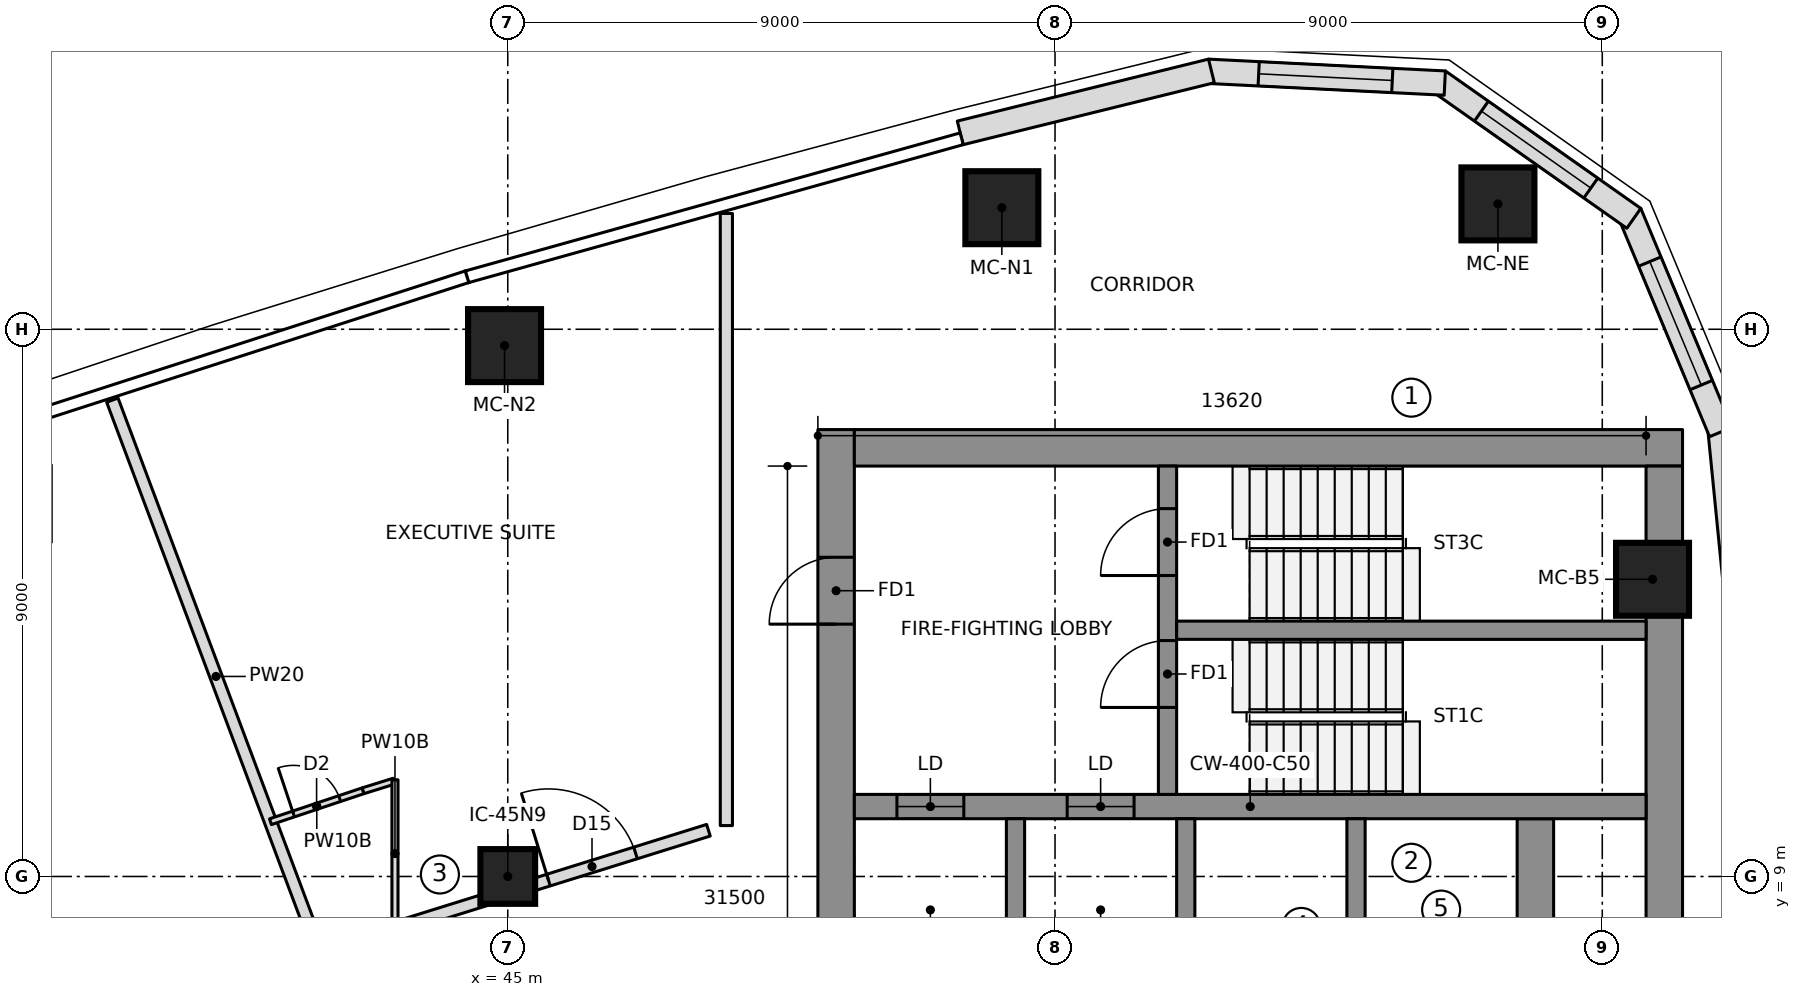
"""IFC4 building model, lengths in metres.
Left out: names, types, materials, properties, quantities, classifications, styles, units other than length and angle.
Written with IfcOpenShell. Run it as: python <this file> out.ifc"""

import sys

from ifc_helpers import new_model, si_unit, direction, frame, frame_2d, origin, origin_2d, place, context, subcontext, project, spatial, polyline, rectangle, outline, extrude, element, fill, save


model = new_model("IFC4")
c1 = context("Model", 3, precision=1e-05, world=origin(), true_north=direction((0.0, 1.0)))
c2 = subcontext(c1, "Body", "Model", "MODEL_VIEW")
j1 = project(units=[si_unit("LENGTHUNIT", "METRE"), si_unit("PLANEANGLEUNIT", "RADIAN")], contexts=[c1])
p1 = place(None, origin())
s1 = spatial("IfcSite", under=j1, at=p1, CompositionType="ELEMENT")
p2 = place(p1, origin())
s2 = spatial("IfcBuilding", under=s1, at=p2, CompositionType="ELEMENT")
p3 = place(p2, frame((0.0, 0.0, 227.9)))
s3 = spatial("IfcBuildingStorey", under=s2, at=p3, CompositionType="ELEMENT", Elevation=227.9)
p4 = place(p3, frame((50.4, 6.65, 0.0), z_axis=(0.0, 0.0, 1.0), x_axis=(0.0, 1.0, 0.0)))
e1 = element("IfcWall", 1, at=p4, inside=s3, PredefinedType="SHEAR", context=c2, shape_type="SweptSolid", body=[
    extrude(rectangle(XDim=9.7, YDim=0.6, at=frame_2d((4.85, 0.0))), origin(), (0.0, 0.0, 1.0), 3.55),
])
p5 = place(p4, frame((6.5, 0.0, 0.0)))
e2 = element("IfcOpeningElement", 2, at=p5, cuts=e1, PredefinedType="OPENING", context=c2, shape_type="SweptSolid", body=[
    extrude(rectangle(XDim=1.1, YDim=2.1, at=frame_2d((0.55, 1.05))), frame((0.0, 0.31, 0.0), z_axis=(0.0, -1.0, 0.0), x_axis=(1.0, 0.0, 0.0)), (0.0, 0.0, 1.0), 0.62),
])
p6 = place(p3, frame((50.7, 16.05, 0.0), z_axis=(0.0, 0.0, 1.0), x_axis=(1.0, 0.0, 0.0)))
e3 = element("IfcWall", 3, at=p6, inside=s3, PredefinedType="SHEAR", context=c2, shape_type="SweptSolid", body=[
    extrude(rectangle(XDim=13.62, YDim=0.6, at=frame_2d((6.81, 0.0))), origin(), (0.0, 0.0, 1.0), 3.55),
])
p7 = place(p3, frame((64.02, 7.502, 0.0), z_axis=(0.0, 0.0, 1.0), x_axis=(0.0, 1.0, 0.0)))
e4 = element("IfcWall", 4, at=p7, inside=s3, PredefinedType="SHEAR", context=c2, shape_type="SweptSolid", body=[
    extrude(rectangle(XDim=8.248, YDim=0.6, at=frame_2d((4.124, 0.0))), origin(), (0.0, 0.0, 1.0), 3.55),
])
p8 = place(p3, frame((61.9, -9.95, 0.0), z_axis=(0.0, 0.0, 1.0), x_axis=(0.0, 1.0, 0.0)))
e5 = element("IfcWall", 5, at=p8, inside=s3, PredefinedType="SHEAR", context=c2, shape_type="SweptSolid", body=[
    extrude(rectangle(XDim=19.9, YDim=0.6, at=frame_2d((9.95, 0.0))), origin(), (0.0, 0.0, 1.0), 3.55),
])
p9 = place(p3, frame((50.7, 10.15, 0.0), z_axis=(0.0, 0.0, 1.0), x_axis=(1.0, 0.0, 0.0)))
e6 = element("IfcWall", 6, at=p9, inside=s3, PredefinedType="SHEAR", context=c2, shape_type="SweptSolid", body=[
    extrude(rectangle(XDim=13.02, YDim=0.4, at=frame_2d((6.51, 0.0))), origin(), (0.0, 0.0, 1.0), 3.55),
])
p10 = place(p9, frame((0.7, 0.0, 0.0)))
e7 = element("IfcOpeningElement", 7, at=p10, cuts=e6, PredefinedType="OPENING", context=c2, shape_type="SweptSolid", body=[
    extrude(rectangle(XDim=1.1, YDim=2.1, at=frame_2d((0.55, 1.05))), frame((0.0, 0.21, 0.0), z_axis=(0.0, -1.0, 0.0), x_axis=(1.0, 0.0, 0.0)), (0.0, 0.0, 1.0), 0.42),
])
p11 = place(p9, frame((3.5, 0.0, 0.0)))
e8 = element("IfcOpeningElement", 8, at=p11, cuts=e6, PredefinedType="OPENING", context=c2, shape_type="SweptSolid", body=[
    extrude(rectangle(XDim=1.1, YDim=2.1, at=frame_2d((0.55, 1.05))), frame((0.0, 0.21, 0.0), z_axis=(0.0, -1.0, 0.0), x_axis=(1.0, 0.0, 0.0)), (0.0, 0.0, 1.0), 0.42),
])
for number, where, z_axis, x_axis in (
    (9, (53.35, 6.95, 0.0), (0.0, 0.0, 1.0), (0.0, 1.0, 0.0)),
    (10, (56.15, 6.95, 0.0), (0.0, 0.0, 1.0), (0.0, 1.0, 0.0)),
    (11, (58.95, 6.95, 0.0), (0.0, 0.0, 1.0), (0.0, 1.0, 0.0)),
):
    element("IfcWall", number, at=place(p3, frame(where, z_axis=z_axis, x_axis=x_axis)), inside=s3, PredefinedType="SHEAR", context=c2, shape_type="SweptSolid", body=[
        extrude(rectangle(XDim=3.0, YDim=0.3, at=frame_2d((1.5, 0.0))), origin(), (0.0, 0.0, 1.0), 3.55),
    ])
p12 = place(p3, frame((55.85, 10.35, 0.0), z_axis=(0.0, 0.0, 1.0), x_axis=(0.0, 1.0, 0.0)))
e12 = element("IfcWall", 12, at=p12, inside=s3, PredefinedType="SHEAR", context=c2, shape_type="SweptSolid", body=[
    extrude(rectangle(XDim=5.4, YDim=0.3, at=frame_2d((2.7, 0.0))), origin(), (0.0, 0.0, 1.0), 3.55),
])
p13 = place(p12, frame((1.43, 0.0, 0.0)))
e13 = element("IfcOpeningElement", 13, at=p13, cuts=e12, PredefinedType="OPENING", context=c2, shape_type="SweptSolid", body=[
    extrude(rectangle(XDim=1.1, YDim=2.1, at=frame_2d((0.55, 1.05))), frame((0.0, 0.16, 0.0), z_axis=(0.0, -1.0, 0.0), x_axis=(1.0, 0.0, 0.0)), (0.0, 0.0, 1.0), 0.32),
])
p14 = place(p12, frame((3.6, 0.0, 0.0)))
e14 = element("IfcOpeningElement", 14, at=p14, cuts=e12, PredefinedType="OPENING", context=c2, shape_type="SweptSolid", body=[
    extrude(rectangle(XDim=1.1, YDim=2.1, at=frame_2d((0.55, 1.05))), frame((0.0, 0.16, 0.0), z_axis=(0.0, -1.0, 0.0), x_axis=(1.0, 0.0, 0.0)), (0.0, 0.0, 1.0), 0.32),
])
p15 = place(p3, frame((56.0, 13.05, 0.0), z_axis=(0.0, 0.0, 1.0), x_axis=(1.0, 0.0, 0.0)))
e15 = element("IfcWall", 15, at=p15, inside=s3, PredefinedType="SHEAR", context=c2, shape_type="SweptSolid", body=[
    extrude(rectangle(XDim=7.72, YDim=0.3, at=frame_2d((3.86, 0.0))), origin(), (0.0, 0.0, 1.0), 3.55),
])
for number, where, z_axis, x_axis in (
    (16, (63.826, 13.888, 0.0), (0.0, 0.0, 1.0), (1.0, 0.0, 0.0)),
    (17, (61.284, 20.062, 0.0), (0.0, 0.0, 1.0), (1.0, 0.0, 0.0)),
    (18, (53.125, 20.0, 0.0), (0.0, 0.0, 1.0), (1.0, 0.0, 0.0)),
    (19, (44.947, 17.731, 0.0), (0.0, 0.0, 1.0), (1.0, 0.0, 0.0)),
):
    element("IfcColumn", number, at=place(p3, frame(where, z_axis=z_axis, x_axis=x_axis)), inside=s3, PredefinedType="COLUMN", context=c2, shape_type="SweptSolid", body=[
        extrude(rectangle(XDim=1.2, YDim=1.2, at=origin_2d()), origin(), (0.0, 0.0, 1.0), 3.55),
    ])
p16 = place(p3, frame((45.0, 9.0, 0.0), z_axis=(0.0, 0.0, 1.0), x_axis=(1.0, 0.0, 0.0)))
e20 = element("IfcColumn", 20, at=p16, inside=s3, PredefinedType="COLUMN", context=c2, shape_type="SweptSolid", body=[
    extrude(rectangle(XDim=0.9, YDim=0.9, at=origin_2d()), origin(), (0.0, 0.0, 1.0), 3.55),
])
p17 = place(p3, frame((65.342, 12.264, 0.0), z_axis=(0.0, 0.0, 1.0), x_axis=(-0.098718218066, 0.995115427185, 0.0)))
e21 = element("IfcWall", 21, at=p17, inside=s3, PredefinedType="NOTDEFINED", context=c2, shape_type="SweptSolid", body=[
    extrude(outline(polyline([(-0.003, -0.2), (4.123, -0.2), (4.063, 0.2), (0.003, 0.2), (-0.003, -0.2)])), origin(), (0.0, 0.0, 1.0), 3.25),
])
p18 = place(p3, frame((64.938, 16.337, 0.0), z_axis=(0.0, 0.0, 1.0), x_axis=(-0.3844335483, 0.923152667191, 0.0)))
e22 = element("IfcWall", 22, at=p18, inside=s3, PredefinedType="NOTDEFINED", context=c2, shape_type="SweptSolid", body=[
    extrude(outline(polyline([(-0.03, -0.2), (3.871, -0.2), (3.756, 0.2), (0.03, 0.2), (-0.03, -0.2)])), origin(), (0.0, 0.0, 1.0), 3.25),
])
p19 = place(p18, frame((0.807, 0.0, 0.6)))
e23 = element("IfcOpeningElement", 23, at=p19, cuts=e22, PredefinedType="OPENING", context=c2, shape_type="SweptSolid", body=[
    extrude(outline(polyline([(0.0, 1.35), (0.084, 1.771), (0.322, 2.128), (0.679, 2.366), (1.1, 2.45), (1.521, 2.366), (1.878, 2.128), (2.116, 1.771), (2.2, 1.35), (2.2, 1.1), (2.116, 0.679), (1.878, 0.322), (1.521, 0.084), (1.1, 0.0), (0.679, 0.084), (0.322, 0.322), (0.084, 0.679), (0.0, 1.1), (0.0, 1.35)])), frame((0.0, 0.21, 0.0), z_axis=(0.0, -1.0, 0.0), x_axis=(1.0, 0.0, 0.0)), (0.0, 0.0, 1.0), 0.42),
])
p20 = place(p3, frame((63.471, 19.858, 0.0), z_axis=(0.0, 0.0, 1.0), x_axis=(-0.817942545532, 0.575299915009, 0.0)))
e24 = element("IfcWall", 24, at=p20, inside=s3, PredefinedType="NOTDEFINED", context=c2, shape_type="SweptSolid", body=[
    extrude(outline(polyline([(-0.058, -0.2), (3.871, -0.2), (3.756, 0.2), (0.058, 0.2), (-0.058, -0.2)])), origin(), (0.0, 0.0, 1.0), 3.25),
])
p21 = place(p20, frame((0.807, 0.0, 0.6)))
e25 = element("IfcOpeningElement", 25, at=p21, cuts=e24, PredefinedType="OPENING", context=c2, shape_type="SweptSolid", body=[
    extrude(outline(polyline([(0.0, 1.35), (0.084, 1.771), (0.322, 2.128), (0.679, 2.366), (1.1, 2.45), (1.521, 2.366), (1.878, 2.128), (2.116, 1.771), (2.2, 1.35), (2.2, 1.1), (2.116, 0.679), (1.878, 0.322), (1.521, 0.084), (1.1, 0.0), (0.679, 0.084), (0.322, 0.322), (0.084, 0.679), (0.0, 1.1), (0.0, 1.35)])), frame((0.0, 0.21, 0.0), z_axis=(0.0, -1.0, 0.0), x_axis=(1.0, 0.0, 0.0)), (0.0, 0.0, 1.0), 0.42),
])
p22 = place(p3, frame((60.352, 22.052, 0.0), z_axis=(0.0, 0.0, 1.0), x_axis=(-0.998758875872, 0.049806705046, 0.0)))
e26 = element("IfcWall", 26, at=p22, inside=s3, PredefinedType="NOTDEFINED", context=c2, shape_type="SweptSolid", body=[
    extrude(outline(polyline([(-0.058, -0.2), (3.843, -0.2), (3.784, 0.2), (0.058, 0.2), (-0.058, -0.2)])), origin(), (0.0, 0.0, 1.0), 3.25),
])
p23 = place(p22, frame((0.807, 0.0, 0.6)))
e27 = element("IfcOpeningElement", 27, at=p23, cuts=e26, PredefinedType="OPENING", context=c2, shape_type="SweptSolid", body=[
    extrude(outline(polyline([(0.0, 1.35), (0.084, 1.771), (0.322, 2.128), (0.679, 2.366), (1.1, 2.45), (1.521, 2.366), (1.878, 2.128), (2.116, 1.771), (2.2, 1.35), (2.2, 1.1), (2.116, 0.679), (1.878, 0.322), (1.521, 0.084), (1.1, 0.0), (0.679, 0.084), (0.322, 0.322), (0.084, 0.679), (0.0, 1.1), (0.0, 1.35)])), frame((0.0, 0.21, 0.0), z_axis=(0.0, -1.0, 0.0), x_axis=(1.0, 0.0, 0.0)), (0.0, 0.0, 1.0), 0.42),
])
p24 = place(p3, frame((56.543, 22.242, 0.0), z_axis=(0.0, 0.0, 1.0), x_axis=(-0.970902342456, -0.23947576373, 0.0)))
e28 = element("IfcWall", 28, at=p24, inside=s3, PredefinedType="NOTDEFINED", context=c2, shape_type="SweptSolid", body=[
    extrude(outline(polyline([(-0.029, -0.2), (4.226, -0.2), (4.226, 0.2), (0.029, 0.2), (-0.029, -0.2)])), origin(), (0.0, 0.0, 1.0), 3.25),
])
p25 = place(p3, frame((41.906, 7.746, 0.0), z_axis=(0.0, 0.0, 1.0), x_axis=(-0.35112895446, 0.936327110224, 0.0)))
e29 = element("IfcWall", 29, at=p25, inside=s3, PredefinedType="PARTITIONING", context=c2, shape_type="SweptSolid", body=[
    extrude(rectangle(XDim=9.706, YDim=0.2, at=frame_2d((4.853, 0.0))), origin(), (0.0, 0.0, 1.0), 3.25),
])
p26 = place(p3, frame((41.097, 9.901, 0.0), z_axis=(0.0, 0.0, 1.0), x_axis=(0.948485479965, 0.3168206027, 0.0)))
e30 = element("IfcWall", 30, at=p26, inside=s3, PredefinedType="PARTITIONING", context=c2, shape_type="SweptSolid", body=[
    extrude(rectangle(XDim=1.606, YDim=0.1, at=frame_2d((0.803, 0.0))), origin(), (0.0, 0.0, 1.0), 3.25),
])
p27 = place(p26, frame((0.4, 0.0, 0.0)))
e31 = element("IfcOpeningElement", 31, at=p27, cuts=e30, PredefinedType="OPENING", context=c2, shape_type="SweptSolid", body=[
    extrude(rectangle(XDim=0.8, YDim=2.1, at=frame_2d((0.4, 1.05))), frame((0.0, 0.06, 0.0), z_axis=(0.0, -1.0, 0.0), x_axis=(1.0, 0.0, 0.0)), (0.0, 0.0, 1.0), 0.12),
])
p28 = place(p3, frame((42.621, 10.409, 0.0), z_axis=(0.0, 0.0, 1.0), x_axis=(0.954618903587, 0.297830067176, 0.0)))
e32 = element("IfcWall", 32, at=p28, inside=s3, PredefinedType="PARTITIONING", context=c2, shape_type="SweptSolid", body=[
    extrude(rectangle(XDim=0.531, YDim=0.1, at=frame_2d((0.266, 0.0))), origin(), (0.0, 0.0, 1.0), 3.25),
])
p29 = place(p3, frame((43.145, 10.59, 0.0), z_axis=(0.0, 0.0, 1.0), x_axis=(0.0, -1.0, 0.0)))
e33 = element("IfcWall", 33, at=p29, inside=s3, PredefinedType="PARTITIONING", context=c2, shape_type="SweptSolid", body=[
    extrude(rectangle(XDim=2.425, YDim=0.1, at=frame_2d((1.213, 0.0))), origin(), (0.0, 0.0, 1.0), 3.25),
])
p30 = place(p3, frame((41.898, 7.764, 0.0), z_axis=(0.0, 0.0, 1.0), x_axis=(0.954667015156, 0.297675813886, 0.0)))
e34 = element("IfcWall", 34, at=p30, inside=s3, PredefinedType="PARTITIONING", context=c2, shape_type="SweptSolid", body=[
    extrude(rectangle(XDim=6.706, YDim=0.2, at=frame_2d((3.353, 0.0))), origin(), (0.0, 0.0, 1.0), 3.25),
])
p31 = place(p30, frame((3.95, 0.0, 0.0)))
e35 = element("IfcOpeningElement", 35, at=p31, cuts=e34, PredefinedType="OPENING", context=c2, shape_type="SweptSolid", body=[
    extrude(rectangle(XDim=1.5, YDim=2.1, at=frame_2d((0.75, 1.05))), frame((0.0, 0.11, 0.0), z_axis=(0.0, -1.0, 0.0), x_axis=(1.0, 0.0, 0.0)), (0.0, 0.0, 1.0), 0.22),
])
p32 = place(p3, frame((48.595, 19.904, 0.0), z_axis=(0.0, 0.0, 1.0), x_axis=(0.0, -1.0, 0.0)))
e36 = element("IfcWall", 36, at=p32, inside=s3, PredefinedType="PARTITIONING", context=c2, shape_type="SweptSolid", body=[
    extrude(rectangle(XDim=10.067, YDim=0.2, at=frame_2d((5.034, 0.0))), origin(), (0.0, 0.0, 1.0), 3.25),
])
p33 = place(p19, origin())
e37 = element("IfcWindow", 37, at=p33, inside=s3, PartitioningType="SINGLE_PANEL", PredefinedType="WINDOW", context=c2, shape_type="SweptSolid", body=[
    extrude(outline(polyline([(0.0, 1.35), (0.084, 1.771), (0.322, 2.128), (0.679, 2.366), (1.1, 2.45), (1.521, 2.366), (1.878, 2.128), (2.116, 1.771), (2.2, 1.35), (2.2, 1.1), (2.116, 0.679), (1.878, 0.322), (1.521, 0.084), (1.1, 0.0), (0.679, 0.084), (0.322, 0.322), (0.084, 0.679), (0.0, 1.1), (0.0, 1.35)])), frame((0.0, 0.17, 0.0), z_axis=(0.0, -1.0, 0.0), x_axis=(1.0, 0.0, 0.0)), (0.0, 0.0, 1.0), 0.06),
])
fill(e23, e37)
p34 = place(p21, origin())
e38 = element("IfcWindow", 38, at=p34, inside=s3, PartitioningType="SINGLE_PANEL", PredefinedType="WINDOW", context=c2, shape_type="SweptSolid", body=[
    extrude(outline(polyline([(0.0, 1.35), (0.084, 1.771), (0.322, 2.128), (0.679, 2.366), (1.1, 2.45), (1.521, 2.366), (1.878, 2.128), (2.116, 1.771), (2.2, 1.35), (2.2, 1.1), (2.116, 0.679), (1.878, 0.322), (1.521, 0.084), (1.1, 0.0), (0.679, 0.084), (0.322, 0.322), (0.084, 0.679), (0.0, 1.1), (0.0, 1.35)])), frame((0.0, 0.17, 0.0), z_axis=(0.0, -1.0, 0.0), x_axis=(1.0, 0.0, 0.0)), (0.0, 0.0, 1.0), 0.06),
])
fill(e25, e38)
p35 = place(p23, origin())
e39 = element("IfcWindow", 39, at=p35, inside=s3, PartitioningType="SINGLE_PANEL", PredefinedType="WINDOW", context=c2, shape_type="SweptSolid", body=[
    extrude(outline(polyline([(0.0, 1.35), (0.084, 1.771), (0.322, 2.128), (0.679, 2.366), (1.1, 2.45), (1.521, 2.366), (1.878, 2.128), (2.116, 1.771), (2.2, 1.35), (2.2, 1.1), (2.116, 0.679), (1.878, 0.322), (1.521, 0.084), (1.1, 0.0), (0.679, 0.084), (0.322, 0.322), (0.084, 0.679), (0.0, 1.1), (0.0, 1.35)])), frame((0.0, 0.17, 0.0), z_axis=(0.0, -1.0, 0.0), x_axis=(1.0, 0.0, 0.0)), (0.0, 0.0, 1.0), 0.06),
])
fill(e27, e39)
p36 = place(p27, origin())
e40 = element("IfcDoor", 40, at=p36, inside=s3, OperationType="SINGLE_SWING_LEFT", PredefinedType="DOOR", context=c2, shape_type="SweptSolid", body=[
    extrude(rectangle(XDim=0.8, YDim=2.1, at=frame_2d((0.4, 1.05))), frame((0.0, 0.025, 0.0), z_axis=(0.0, -1.0, 0.0), x_axis=(1.0, 0.0, 0.0)), (0.0, 0.0, 1.0), 0.05),
])
fill(e31, e40)
p37 = place(p31, origin())
e41 = element("IfcDoor", 41, at=p37, inside=s3, OperationType="DOUBLE_DOOR_SINGLE_SWING", PredefinedType="DOOR", context=c2, shape_type="SweptSolid", body=[
    extrude(rectangle(XDim=1.5, YDim=2.1, at=frame_2d((0.75, 1.05))), frame((0.0, 0.025, 0.0), z_axis=(0.0, -1.0, 0.0), x_axis=(1.0, 0.0, 0.0)), (0.0, 0.0, 1.0), 0.05),
])
fill(e35, e41)
p38 = place(p10, origin())
e42 = element("IfcDoor", 42, at=p38, inside=s3, OperationType="DOUBLE_DOOR_SLIDING", PredefinedType="DOOR", context=c2, shape_type="SweptSolid", body=[
    extrude(rectangle(XDim=1.1, YDim=2.1, at=frame_2d((0.55, 1.05))), frame((0.0, 0.025, 0.0), z_axis=(0.0, -1.0, 0.0), x_axis=(1.0, 0.0, 0.0)), (0.0, 0.0, 1.0), 0.05),
])
fill(e7, e42)
p39 = place(p11, origin())
e43 = element("IfcDoor", 43, at=p39, inside=s3, OperationType="DOUBLE_DOOR_SLIDING", PredefinedType="DOOR", context=c2, shape_type="SweptSolid", body=[
    extrude(rectangle(XDim=1.1, YDim=2.1, at=frame_2d((0.55, 1.05))), frame((0.0, 0.025, 0.0), z_axis=(0.0, -1.0, 0.0), x_axis=(1.0, 0.0, 0.0)), (0.0, 0.0, 1.0), 0.05),
])
fill(e8, e43)
p40 = place(p13, origin())
e44 = element("IfcDoor", 44, at=p40, inside=s3, OperationType="SINGLE_SWING_RIGHT", PredefinedType="DOOR", context=c2, shape_type="SweptSolid", body=[
    extrude(rectangle(XDim=1.1, YDim=2.1, at=frame_2d((0.55, 1.05))), frame((0.0, 0.025, 0.0), z_axis=(0.0, -1.0, 0.0), x_axis=(1.0, 0.0, 0.0)), (0.0, 0.0, 1.0), 0.05),
])
fill(e13, e44)
p41 = place(p14, origin())
e45 = element("IfcDoor", 45, at=p41, inside=s3, OperationType="SINGLE_SWING_RIGHT", PredefinedType="DOOR", context=c2, shape_type="SweptSolid", body=[
    extrude(rectangle(XDim=1.1, YDim=2.1, at=frame_2d((0.55, 1.05))), frame((0.0, 0.025, 0.0), z_axis=(0.0, -1.0, 0.0), x_axis=(1.0, 0.0, 0.0)), (0.0, 0.0, 1.0), 0.05),
])
fill(e14, e45)
p42 = place(p5, origin())
e46 = element("IfcDoor", 46, at=p42, inside=s3, OperationType="SINGLE_SWING_RIGHT", PredefinedType="DOOR", context=c2, shape_type="SweptSolid", body=[
    extrude(rectangle(XDim=1.1, YDim=2.1, at=frame_2d((0.55, 1.05))), frame((0.0, 0.025, 0.0), z_axis=(0.0, -1.0, 0.0), x_axis=(1.0, 0.0, 0.0)), (0.0, 0.0, 1.0), 0.05),
])
fill(e2, e46)
save(model, sys.argv[1])
